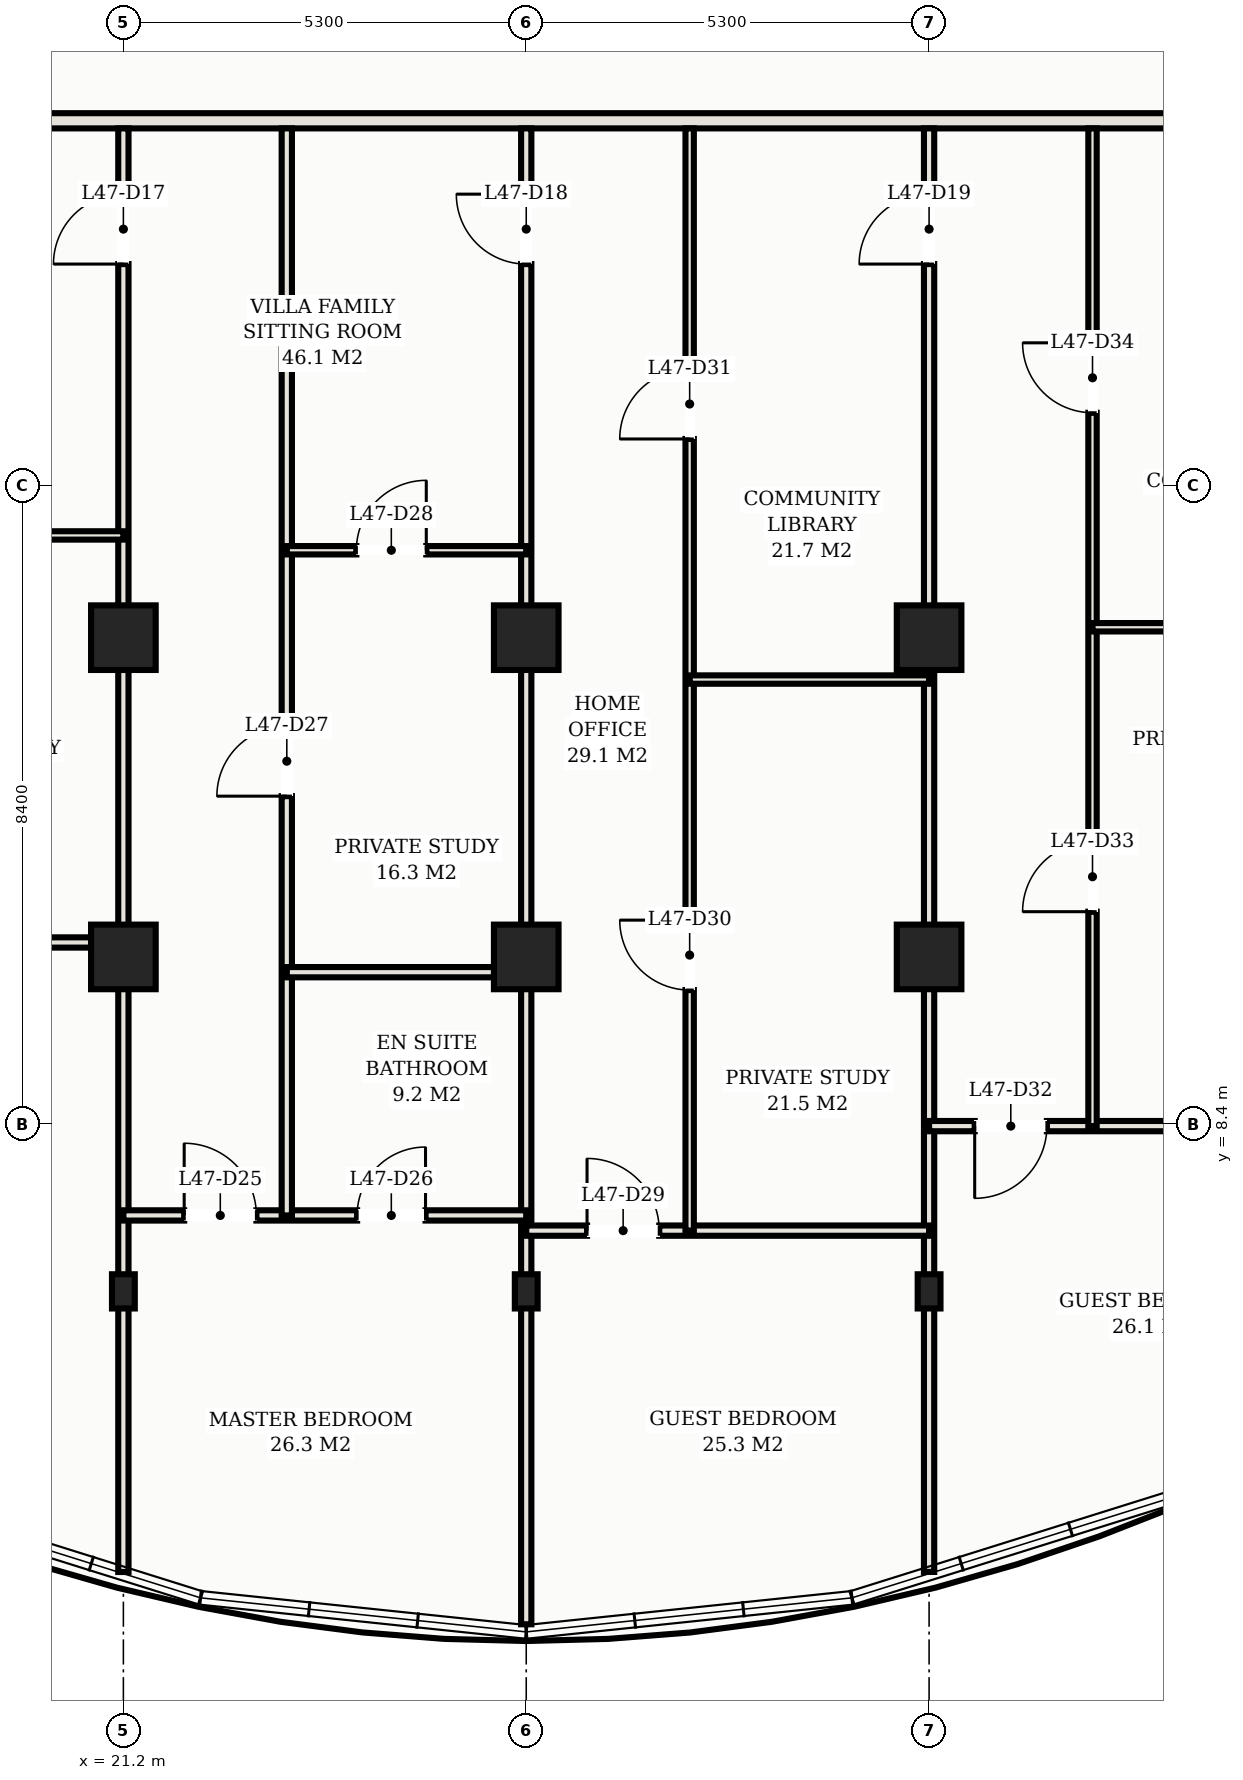
"""IFC4 building model, lengths in metres.
Left out: names, types, materials, properties, quantities, classifications, styles, units other than length and angle.
Written with IfcOpenShell. Run it as: python <this file> out.ifc"""

import sys

from ifc_helpers import new_model, si_unit, direction, frame, frame_2d, origin, origin_2d, place, context, subcontext, project, spatial, rectangle, hollow_rectangle, extrude, element, fill, save


model = new_model("IFC4")
c1 = context("Model", 3, precision=1e-05, world=origin(), true_north=direction((0.0, 1.0)))
c2 = subcontext(c1, "Body", "Model", "MODEL_VIEW")
j1 = project(units=[si_unit("LENGTHUNIT", "METRE"), si_unit("PLANEANGLEUNIT", "RADIAN")], contexts=[c1])
p1 = place(None, origin())
s1 = spatial("IfcSite", under=j1, at=p1, CompositionType="ELEMENT")
p2 = place(p1, origin())
s2 = spatial("IfcBuilding", under=s1, at=p2, CompositionType="ELEMENT")
p3 = place(p2, frame((0.0, 0.0, 172.2)))
s3 = spatial("IfcBuildingStorey", under=s2, at=p3, CompositionType="ELEMENT", Elevation=172.2)
for number, where, z_axis, x_axis in (
    (1, (21.2, 14.8, 0.0), (0.0, 0.0, 1.0), (1.0, 0.0, 0.0)),
    (2, (21.2, 10.6, 0.0), (0.0, 0.0, 1.0), (1.0, 0.0, 0.0)),
    (3, (26.5, 14.8, 0.0), (0.0, 0.0, 1.0), (1.0, 0.0, 0.0)),
    (4, (26.5, 10.6, 0.0), (0.0, 0.0, 1.0), (1.0, 0.0, 0.0)),
    (5, (31.8, 14.8, 0.0), (0.0, 0.0, 1.0), (1.0, 0.0, 0.0)),
    (6, (31.8, 10.6, 0.0), (0.0, 0.0, 1.0), (1.0, 0.0, 0.0)),
):
    element("IfcColumn", number, at=place(p3, frame(where, z_axis=z_axis, x_axis=x_axis)), inside=s3, PredefinedType="COLUMN", context=c2, shape_type="SweptSolid", body=[
        extrude(hollow_rectangle(XDim=0.85, YDim=0.85, WallThickness=0.028, at=origin_2d()), origin(), (0.0, 0.0, 1.0), 3.3),
    ])
for number, where, z_axis, x_axis in (
    (7, (21.2, 6.2, 0.0), (0.0, 0.0, 1.0), (1.0, 0.0, 0.0)),
    (8, (26.5, 6.2, 0.0), (0.0, 0.0, 1.0), (1.0, 0.0, 0.0)),
    (9, (31.8, 6.2, 0.0), (0.0, 0.0, 1.0), (1.0, 0.0, 0.0)),
):
    element("IfcColumn", number, at=place(p3, frame(where, z_axis=z_axis, x_axis=x_axis)), inside=s3, PredefinedType="COLUMN", context=c2, shape_type="SweptSolid", body=[
        extrude(hollow_rectangle(XDim=0.3, YDim=0.45, WallThickness=0.016, at=origin_2d()), origin(), (0.0, 0.0, 1.0), 3.3),
    ])
p4 = place(p3, frame((4.32, 21.6, 0.0), z_axis=(0.0, 0.0, 1.0), x_axis=(1.0, 0.0, 0.0)))
e10 = element("IfcWall", 10, at=p4, inside=s3, PredefinedType="PARTITIONING", context=c2, shape_type="SweptSolid", body=[
    extrude(rectangle(XDim=44.36, YDim=0.2, at=frame_2d((22.18, 0.0))), origin(), (0.0, 0.0, 1.0), 2.38),
])
p5 = place(p4, frame((7.03, 0.0, 0.0)))
e11 = element("IfcOpeningElement", 11, at=p5, cuts=e10, PredefinedType="OPENING", context=c2, shape_type="SweptSolid", body=[
    extrude(rectangle(XDim=1.1, YDim=2.25, at=frame_2d((0.55, 1.125))), frame((0.0, 0.11, 0.0), z_axis=(0.0, -1.0, 0.0), x_axis=(1.0, 0.0, 0.0)), (0.0, 0.0, 1.0), 0.22),
])
p6 = place(p4, frame((2.635, 0.0, 0.0)))
e12 = element("IfcOpeningElement", 12, at=p6, cuts=e10, PredefinedType="OPENING", context=c2, shape_type="SweptSolid", body=[
    extrude(rectangle(XDim=0.92, YDim=2.15, at=frame_2d((0.46, 1.075))), frame((0.0, 0.11, 0.0), z_axis=(0.0, -1.0, 0.0), x_axis=(1.0, 0.0, 0.0)), (0.0, 0.0, 1.0), 0.22),
])
p7 = place(p4, frame((40.805, 0.0, 0.0)))
e13 = element("IfcOpeningElement", 13, at=p7, cuts=e10, PredefinedType="OPENING", context=c2, shape_type="SweptSolid", body=[
    extrude(rectangle(XDim=0.92, YDim=2.15, at=frame_2d((0.46, 1.075))), frame((0.0, 0.11, 0.0), z_axis=(0.0, -1.0, 0.0), x_axis=(1.0, 0.0, 0.0)), (0.0, 0.0, 1.0), 0.22),
])
p8 = place(p3, frame((21.2, 2.508, 0.0), z_axis=(0.0, 0.0, 1.0), x_axis=(0.0, 1.0, 0.0)))
e14 = element("IfcWall", 14, at=p8, inside=s3, PredefinedType="PARTITIONING", context=c2, shape_type="SweptSolid", body=[
    extrude(rectangle(XDim=18.992, YDim=0.135, at=frame_2d((9.496, 0.0))), origin(), (0.0, 0.0, 1.0), 2.38),
])
p9 = place(p8, frame((17.207, 0.0, 0.0)))
e15 = element("IfcOpeningElement", 15, at=p9, cuts=e14, PredefinedType="OPENING", context=c2, shape_type="SweptSolid", body=[
    extrude(rectangle(XDim=0.92, YDim=2.15, at=frame_2d((0.46, 1.075))), frame((0.0, 0.078, 0.0), z_axis=(0.0, -1.0, 0.0), x_axis=(1.0, 0.0, 0.0)), (0.0, 0.0, 1.0), 0.155),
])
p10 = place(p3, frame((26.5, 1.82, 0.0), z_axis=(0.0, 0.0, 1.0), x_axis=(0.0, 1.0, 0.0)))
e16 = element("IfcWall", 16, at=p10, inside=s3, PredefinedType="PARTITIONING", context=c2, shape_type="SweptSolid", body=[
    extrude(rectangle(XDim=19.68, YDim=0.135, at=frame_2d((9.84, 0.0))), origin(), (0.0, 0.0, 1.0), 2.38),
])
p11 = place(p10, frame((17.895, 0.0, 0.0)))
e17 = element("IfcOpeningElement", 17, at=p11, cuts=e16, PredefinedType="OPENING", context=c2, shape_type="SweptSolid", body=[
    extrude(rectangle(XDim=0.92, YDim=2.15, at=frame_2d((0.46, 1.075))), frame((0.0, 0.078, 0.0), z_axis=(0.0, -1.0, 0.0), x_axis=(1.0, 0.0, 0.0)), (0.0, 0.0, 1.0), 0.155),
])
p12 = place(p3, frame((31.8, 2.509, 0.0), z_axis=(0.0, 0.0, 1.0), x_axis=(0.0, 1.0, 0.0)))
e18 = element("IfcWall", 18, at=p12, inside=s3, PredefinedType="PARTITIONING", context=c2, shape_type="SweptSolid", body=[
    extrude(rectangle(XDim=18.991, YDim=0.135, at=frame_2d((9.496, 0.0))), origin(), (0.0, 0.0, 1.0), 2.38),
])
p13 = place(p12, frame((17.206, 0.0, 0.0)))
e19 = element("IfcOpeningElement", 19, at=p13, cuts=e18, PredefinedType="OPENING", context=c2, shape_type="SweptSolid", body=[
    extrude(rectangle(XDim=0.92, YDim=2.15, at=frame_2d((0.46, 1.075))), frame((0.0, 0.078, 0.0), z_axis=(0.0, -1.0, 0.0), x_axis=(1.0, 0.0, 0.0)), (0.0, 0.0, 1.0), 0.155),
])
p14 = place(p3, frame((10.6, 10.79, 0.0), z_axis=(0.0, 0.0, 1.0), x_axis=(1.0, 0.0, 0.0)))
e20 = element("IfcWall", 20, at=p14, inside=s3, PredefinedType="PARTITIONING", context=c2, shape_type="SweptSolid", body=[
    extrude(rectangle(XDim=10.6, YDim=0.135, at=frame_2d((5.3, 0.0))), origin(), (0.0, 0.0, 1.0), 2.38),
])
p15 = place(p14, frame((0.425, 0.0, 0.0)))
e21 = element("IfcOpeningElement", 21, at=p15, cuts=e20, PredefinedType="OPENING", context=c2, shape_type="SweptSolid", body=[
    extrude(rectangle(XDim=1.5, YDim=2.25, at=frame_2d((0.75, 1.125))), frame((0.0, 0.078, 0.0), z_axis=(0.0, -1.0, 0.0), x_axis=(1.0, 0.0, 0.0)), (0.0, 0.0, 1.0), 0.155),
])
p16 = place(p3, frame((15.9, 16.145, 0.0), z_axis=(0.0, 0.0, 1.0), x_axis=(1.0, 0.0, 0.0)))
e22 = element("IfcWall", 22, at=p16, inside=s3, PredefinedType="MOVABLE", context=c2, shape_type="SweptSolid", body=[
    extrude(rectangle(XDim=5.3, YDim=0.11, at=frame_2d((2.65, 0.0))), origin(), (0.0, 0.0, 1.0), 2.38),
])
p17 = place(p16, frame((1.84, 0.0, 0.0)))
e23 = element("IfcOpeningElement", 23, at=p17, cuts=e22, PredefinedType="OPENING", context=c2, shape_type="SweptSolid", body=[
    extrude(rectangle(XDim=0.92, YDim=2.15, at=frame_2d((0.46, 1.075))), frame((0.0, 0.065, 0.0), z_axis=(0.0, -1.0, 0.0), x_axis=(1.0, 0.0, 0.0)), (0.0, 0.0, 1.0), 0.13),
])
p18 = place(p3, frame((21.2, 7.199, 0.0), z_axis=(0.0, 0.0, 1.0), x_axis=(1.0, 0.0, 0.0)))
e24 = element("IfcWall", 24, at=p18, inside=s3, PredefinedType="PARTITIONING", context=c2, shape_type="SweptSolid", body=[
    extrude(rectangle(XDim=5.3, YDim=0.135, at=frame_2d((2.65, 0.0))), origin(), (0.0, 0.0, 1.0), 2.38),
])
p19 = place(p18, frame((0.8, 0.0, 0.0)))
e25 = element("IfcOpeningElement", 25, at=p19, cuts=e24, PredefinedType="OPENING", context=c2, shape_type="SweptSolid", body=[
    extrude(rectangle(XDim=0.95, YDim=2.15, at=frame_2d((0.475, 1.075))), frame((0.0, 0.078, 0.0), z_axis=(0.0, -1.0, 0.0), x_axis=(1.0, 0.0, 0.0)), (0.0, 0.0, 1.0), 0.155),
])
p20 = place(p18, frame((3.075, 0.0, 0.0)))
e26 = element("IfcOpeningElement", 26, at=p20, cuts=e24, PredefinedType="OPENING", context=c2, shape_type="SweptSolid", body=[
    extrude(rectangle(XDim=0.9, YDim=2.15, at=frame_2d((0.45, 1.075))), frame((0.0, 0.078, 0.0), z_axis=(0.0, -1.0, 0.0), x_axis=(1.0, 0.0, 0.0)), (0.0, 0.0, 1.0), 0.155),
])
p21 = place(p3, frame((23.35, 7.199, 0.0), z_axis=(0.0, 0.0, 1.0), x_axis=(0.0, 1.0, 0.0)))
e27 = element("IfcWall", 27, at=p21, inside=s3, PredefinedType="PARTITIONING", context=c2, shape_type="SweptSolid", body=[
    extrude(rectangle(XDim=14.301, YDim=0.135, at=frame_2d((7.15, 0.0))), origin(), (0.0, 0.0, 1.0), 2.38),
])
p22 = place(p21, frame((5.516, 0.0, 0.0)))
e28 = element("IfcOpeningElement", 28, at=p22, cuts=e27, PredefinedType="OPENING", context=c2, shape_type="SweptSolid", body=[
    extrude(rectangle(XDim=0.92, YDim=2.15, at=frame_2d((0.46, 1.075))), frame((0.0, 0.078, 0.0), z_axis=(0.0, -1.0, 0.0), x_axis=(1.0, 0.0, 0.0)), (0.0, 0.0, 1.0), 0.155),
])
p23 = place(p3, frame((23.35, 10.399, 0.0), z_axis=(0.0, 0.0, 1.0), x_axis=(1.0, 0.0, 0.0)))
e29 = element("IfcWall", 29, at=p23, inside=s3, PredefinedType="PARTITIONING", context=c2, shape_type="SweptSolid", body=[
    extrude(rectangle(XDim=3.15, YDim=0.135, at=frame_2d((1.575, 0.0))), origin(), (0.0, 0.0, 1.0), 2.38),
])
p24 = place(p3, frame((23.35, 15.95, 0.0), z_axis=(0.0, 0.0, 1.0), x_axis=(1.0, 0.0, 0.0)))
e30 = element("IfcWall", 30, at=p24, inside=s3, PredefinedType="MOVABLE", context=c2, shape_type="SweptSolid", body=[
    extrude(rectangle(XDim=3.15, YDim=0.11, at=frame_2d((1.575, 0.0))), origin(), (0.0, 0.0, 1.0), 2.38),
])
p25 = place(p24, frame((0.915, 0.0, 0.0)))
e31 = element("IfcOpeningElement", 31, at=p25, cuts=e30, PredefinedType="OPENING", context=c2, shape_type="SweptSolid", body=[
    extrude(rectangle(XDim=0.92, YDim=2.15, at=frame_2d((0.46, 1.075))), frame((0.0, 0.065, 0.0), z_axis=(0.0, -1.0, 0.0), x_axis=(1.0, 0.0, 0.0)), (0.0, 0.0, 1.0), 0.13),
])
p26 = place(p3, frame((26.5, 6.999, 0.0), z_axis=(0.0, 0.0, 1.0), x_axis=(1.0, 0.0, 0.0)))
e32 = element("IfcWall", 32, at=p26, inside=s3, PredefinedType="PARTITIONING", context=c2, shape_type="SweptSolid", body=[
    extrude(rectangle(XDim=5.3, YDim=0.135, at=frame_2d((2.65, 0.0))), origin(), (0.0, 0.0, 1.0), 2.38),
])
p27 = place(p26, frame((0.8, 0.0, 0.0)))
e33 = element("IfcOpeningElement", 33, at=p27, cuts=e32, PredefinedType="OPENING", context=c2, shape_type="SweptSolid", body=[
    extrude(rectangle(XDim=0.95, YDim=2.15, at=frame_2d((0.475, 1.075))), frame((0.0, 0.078, 0.0), z_axis=(0.0, -1.0, 0.0), x_axis=(1.0, 0.0, 0.0)), (0.0, 0.0, 1.0), 0.155),
])
p28 = place(p3, frame((28.65, 6.999, 0.0), z_axis=(0.0, 0.0, 1.0), x_axis=(0.0, 1.0, 0.0)))
e34 = element("IfcWall", 34, at=p28, inside=s3, PredefinedType="MOVABLE", context=c2, shape_type="SweptSolid", body=[
    extrude(rectangle(XDim=14.501, YDim=0.11, at=frame_2d((7.25, 0.0))), origin(), (0.0, 0.0, 1.0), 2.38),
])
p29 = place(p28, frame((3.165, 0.0, 0.0)))
e35 = element("IfcOpeningElement", 35, at=p29, cuts=e34, PredefinedType="OPENING", context=c2, shape_type="SweptSolid", body=[
    extrude(rectangle(XDim=0.92, YDim=2.15, at=frame_2d((0.46, 1.075))), frame((0.0, 0.065, 0.0), z_axis=(0.0, -1.0, 0.0), x_axis=(1.0, 0.0, 0.0)), (0.0, 0.0, 1.0), 0.13),
])
p30 = place(p28, frame((10.415, 0.0, 0.0)))
e36 = element("IfcOpeningElement", 36, at=p30, cuts=e34, PredefinedType="OPENING", context=c2, shape_type="SweptSolid", body=[
    extrude(rectangle(XDim=0.92, YDim=2.15, at=frame_2d((0.46, 1.075))), frame((0.0, 0.065, 0.0), z_axis=(0.0, -1.0, 0.0), x_axis=(1.0, 0.0, 0.0)), (0.0, 0.0, 1.0), 0.13),
])
p31 = place(p3, frame((28.65, 14.249, 0.0), z_axis=(0.0, 0.0, 1.0), x_axis=(1.0, 0.0, 0.0)))
e37 = element("IfcWall", 37, at=p31, inside=s3, PredefinedType="MOVABLE", context=c2, shape_type="SweptSolid", body=[
    extrude(rectangle(XDim=3.15, YDim=0.11, at=frame_2d((1.575, 0.0))), origin(), (0.0, 0.0, 1.0), 2.38),
])
p32 = place(p3, frame((31.8, 8.374, 0.0), z_axis=(0.0, 0.0, 1.0), x_axis=(1.0, 0.0, 0.0)))
e38 = element("IfcWall", 38, at=p32, inside=s3, PredefinedType="PARTITIONING", context=c2, shape_type="SweptSolid", body=[
    extrude(rectangle(XDim=5.3, YDim=0.135, at=frame_2d((2.65, 0.0))), origin(), (0.0, 0.0, 1.0), 2.38),
])
p33 = place(p32, frame((0.6, 0.0, 0.0)))
e39 = element("IfcOpeningElement", 39, at=p33, cuts=e38, PredefinedType="OPENING", context=c2, shape_type="SweptSolid", body=[
    extrude(rectangle(XDim=0.95, YDim=2.15, at=frame_2d((0.475, 1.075))), frame((0.0, 0.078, 0.0), z_axis=(0.0, -1.0, 0.0), x_axis=(1.0, 0.0, 0.0)), (0.0, 0.0, 1.0), 0.155),
])
p34 = place(p3, frame((33.95, 8.374, 0.0), z_axis=(0.0, 0.0, 1.0), x_axis=(0.0, 1.0, 0.0)))
e40 = element("IfcWall", 40, at=p34, inside=s3, PredefinedType="MOVABLE", context=c2, shape_type="SweptSolid", body=[
    extrude(rectangle(XDim=13.126, YDim=0.11, at=frame_2d((6.563, 0.0))), origin(), (0.0, 0.0, 1.0), 2.38),
])
p35 = place(p34, frame((2.821, 0.0, 0.0)))
e41 = element("IfcOpeningElement", 41, at=p35, cuts=e40, PredefinedType="OPENING", context=c2, shape_type="SweptSolid", body=[
    extrude(rectangle(XDim=0.92, YDim=2.15, at=frame_2d((0.46, 1.075))), frame((0.0, 0.065, 0.0), z_axis=(0.0, -1.0, 0.0), x_axis=(1.0, 0.0, 0.0)), (0.0, 0.0, 1.0), 0.13),
])
p36 = place(p34, frame((9.385, 0.0, 0.0)))
e42 = element("IfcOpeningElement", 42, at=p36, cuts=e40, PredefinedType="OPENING", context=c2, shape_type="SweptSolid", body=[
    extrude(rectangle(XDim=0.92, YDim=2.15, at=frame_2d((0.46, 1.075))), frame((0.0, 0.065, 0.0), z_axis=(0.0, -1.0, 0.0), x_axis=(1.0, 0.0, 0.0)), (0.0, 0.0, 1.0), 0.13),
])
p37 = place(p3, frame((33.95, 14.937, 0.0), z_axis=(0.0, 0.0, 1.0), x_axis=(1.0, 0.0, 0.0)))
e43 = element("IfcWall", 43, at=p37, inside=s3, PredefinedType="MOVABLE", context=c2, shape_type="SweptSolid", body=[
    extrude(rectangle(XDim=3.15, YDim=0.11, at=frame_2d((1.575, 0.0))), origin(), (0.0, 0.0, 1.0), 2.38),
])
p38 = place(p9, origin())
e44 = element("IfcDoor", 44, at=p38, inside=s3, OperationType="SINGLE_SWING_LEFT", PredefinedType="DOOR", context=c2, shape_type="SweptSolid", body=[
    extrude(rectangle(XDim=0.92, YDim=2.15, at=frame_2d((0.46, 1.075))), frame((0.0, 0.025, 0.0), z_axis=(0.0, -1.0, 0.0), x_axis=(1.0, 0.0, 0.0)), (0.0, 0.0, 1.0), 0.05),
])
fill(e15, e44)
p39 = place(p11, origin())
e45 = element("IfcDoor", 45, at=p39, inside=s3, OperationType="SINGLE_SWING_RIGHT", PredefinedType="DOOR", context=c2, shape_type="SweptSolid", body=[
    extrude(rectangle(XDim=0.92, YDim=2.15, at=frame_2d((0.46, 1.075))), frame((0.0, 0.025, 0.0), z_axis=(0.0, -1.0, 0.0), x_axis=(1.0, 0.0, 0.0)), (0.0, 0.0, 1.0), 0.05),
])
fill(e17, e45)
p40 = place(p13, origin())
e46 = element("IfcDoor", 46, at=p40, inside=s3, OperationType="SINGLE_SWING_LEFT", PredefinedType="DOOR", context=c2, shape_type="SweptSolid", body=[
    extrude(rectangle(XDim=0.92, YDim=2.15, at=frame_2d((0.46, 1.075))), frame((0.0, 0.025, 0.0), z_axis=(0.0, -1.0, 0.0), x_axis=(1.0, 0.0, 0.0)), (0.0, 0.0, 1.0), 0.05),
])
fill(e19, e46)
p41 = place(p19, origin())
e47 = element("IfcDoor", 47, at=p41, inside=s3, OperationType="SINGLE_SWING_LEFT", PredefinedType="DOOR", context=c2, shape_type="SweptSolid", body=[
    extrude(rectangle(XDim=0.95, YDim=2.15, at=frame_2d((0.475, 1.075))), frame((0.0, 0.025, 0.0), z_axis=(0.0, -1.0, 0.0), x_axis=(1.0, 0.0, 0.0)), (0.0, 0.0, 1.0), 0.05),
])
fill(e25, e47)
p42 = place(p20, origin())
e48 = element("IfcDoor", 48, at=p42, inside=s3, OperationType="SINGLE_SWING_RIGHT", PredefinedType="DOOR", context=c2, shape_type="SweptSolid", body=[
    extrude(rectangle(XDim=0.9, YDim=2.15, at=frame_2d((0.45, 1.075))), frame((0.0, 0.025, 0.0), z_axis=(0.0, -1.0, 0.0), x_axis=(1.0, 0.0, 0.0)), (0.0, 0.0, 1.0), 0.05),
])
fill(e26, e48)
p43 = place(p22, origin())
e49 = element("IfcDoor", 49, at=p43, inside=s3, OperationType="SINGLE_SWING_LEFT", PredefinedType="DOOR", context=c2, shape_type="SweptSolid", body=[
    extrude(rectangle(XDim=0.92, YDim=2.15, at=frame_2d((0.46, 1.075))), frame((0.0, 0.025, 0.0), z_axis=(0.0, -1.0, 0.0), x_axis=(1.0, 0.0, 0.0)), (0.0, 0.0, 1.0), 0.05),
])
fill(e28, e49)
p44 = place(p25, origin())
e50 = element("IfcDoor", 50, at=p44, inside=s3, OperationType="SINGLE_SWING_RIGHT", PredefinedType="DOOR", context=c2, shape_type="SweptSolid", body=[
    extrude(rectangle(XDim=0.92, YDim=2.15, at=frame_2d((0.46, 1.075))), frame((0.0, 0.025, 0.0), z_axis=(0.0, -1.0, 0.0), x_axis=(1.0, 0.0, 0.0)), (0.0, 0.0, 1.0), 0.05),
])
fill(e31, e50)
p45 = place(p27, origin())
e51 = element("IfcDoor", 51, at=p45, inside=s3, OperationType="SINGLE_SWING_LEFT", PredefinedType="DOOR", context=c2, shape_type="SweptSolid", body=[
    extrude(rectangle(XDim=0.95, YDim=2.15, at=frame_2d((0.475, 1.075))), frame((0.0, 0.025, 0.0), z_axis=(0.0, -1.0, 0.0), x_axis=(1.0, 0.0, 0.0)), (0.0, 0.0, 1.0), 0.05),
])
fill(e33, e51)
p46 = place(p29, origin())
e52 = element("IfcDoor", 52, at=p46, inside=s3, OperationType="SINGLE_SWING_RIGHT", PredefinedType="DOOR", context=c2, shape_type="SweptSolid", body=[
    extrude(rectangle(XDim=0.92, YDim=2.15, at=frame_2d((0.46, 1.075))), frame((0.0, 0.025, 0.0), z_axis=(0.0, -1.0, 0.0), x_axis=(1.0, 0.0, 0.0)), (0.0, 0.0, 1.0), 0.05),
])
fill(e35, e52)
p47 = place(p30, origin())
e53 = element("IfcDoor", 53, at=p47, inside=s3, OperationType="SINGLE_SWING_LEFT", PredefinedType="DOOR", context=c2, shape_type="SweptSolid", body=[
    extrude(rectangle(XDim=0.92, YDim=2.15, at=frame_2d((0.46, 1.075))), frame((0.0, 0.025, 0.0), z_axis=(0.0, -1.0, 0.0), x_axis=(1.0, 0.0, 0.0)), (0.0, 0.0, 1.0), 0.05),
])
fill(e36, e53)
p48 = place(p33, frame((0.95, 0.0, 0.0), z_axis=(0.0, 0.0, 1.0), x_axis=(-1.0, 0.0, 0.0)))
e54 = element("IfcDoor", 54, at=p48, inside=s3, OperationType="SINGLE_SWING_RIGHT", PredefinedType="DOOR", context=c2, shape_type="SweptSolid", body=[
    extrude(rectangle(XDim=0.95, YDim=2.15, at=frame_2d((0.475, 1.075))), frame((0.0, 0.025, 0.0), z_axis=(0.0, -1.0, 0.0), x_axis=(1.0, 0.0, 0.0)), (0.0, 0.0, 1.0), 0.05),
])
fill(e39, e54)
p49 = place(p35, origin())
e55 = element("IfcDoor", 55, at=p49, inside=s3, OperationType="SINGLE_SWING_LEFT", PredefinedType="DOOR", context=c2, shape_type="SweptSolid", body=[
    extrude(rectangle(XDim=0.92, YDim=2.15, at=frame_2d((0.46, 1.075))), frame((0.0, 0.025, 0.0), z_axis=(0.0, -1.0, 0.0), x_axis=(1.0, 0.0, 0.0)), (0.0, 0.0, 1.0), 0.05),
])
fill(e41, e55)
p50 = place(p36, origin())
e56 = element("IfcDoor", 56, at=p50, inside=s3, OperationType="SINGLE_SWING_RIGHT", PredefinedType="DOOR", context=c2, shape_type="SweptSolid", body=[
    extrude(rectangle(XDim=0.92, YDim=2.15, at=frame_2d((0.46, 1.075))), frame((0.0, 0.025, 0.0), z_axis=(0.0, -1.0, 0.0), x_axis=(1.0, 0.0, 0.0)), (0.0, 0.0, 1.0), 0.05),
])
fill(e42, e56)
save(model, sys.argv[1])
